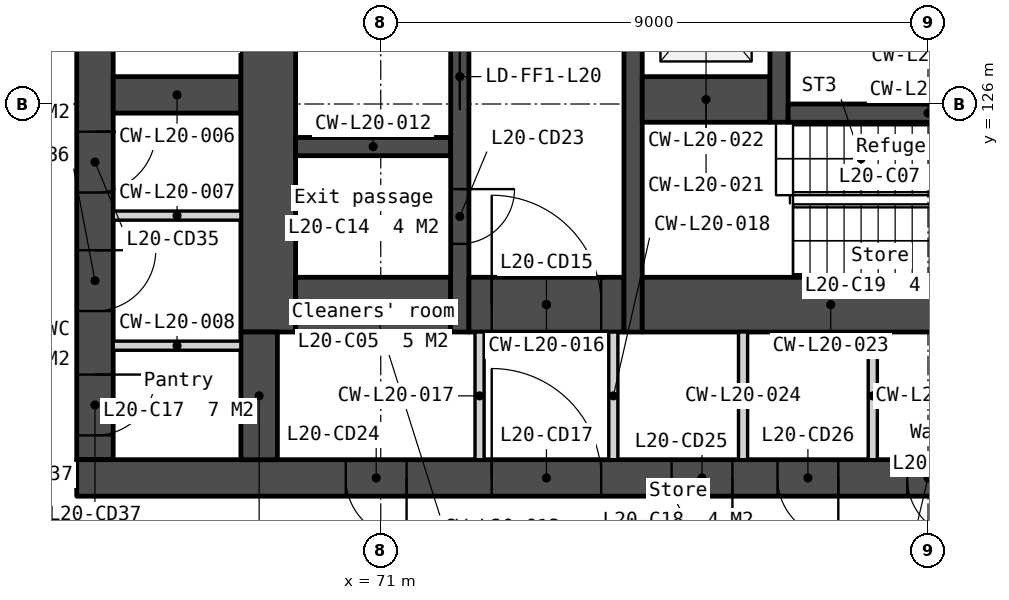
"""IFC4 building model, lengths in metres.
Left out: names, types, materials, properties, quantities, classifications, styles, units other than length and angle.
Written with IfcOpenShell. Run it as: python <this file> out.ifc"""

import sys

from ifc_helpers import new_model, si_unit, direction, frame, frame_2d, origin, place, context, subcontext, project, spatial, polyline, rectangle, outline, extrude, element, fill, save


model = new_model("IFC4")
c1 = context("Model", 3, precision=1e-05, world=origin(), true_north=direction((0.0, 1.0)))
c2 = subcontext(c1, "Body", "Model", "MODEL_VIEW")
j1 = project(units=[si_unit("LENGTHUNIT", "METRE"), si_unit("PLANEANGLEUNIT", "RADIAN")], contexts=[c1])
p1 = place(None, origin())
s1 = spatial("IfcSite", under=j1, at=p1, CompositionType="ELEMENT")
p2 = place(p1, origin())
s2 = spatial("IfcBuilding", under=s1, at=p2, CompositionType="ELEMENT")
p3 = place(p2, frame((0.0, 0.0, 85.3)))
s3 = spatial("IfcBuildingStorey", under=s2, at=p3, CompositionType="ELEMENT", Elevation=85.3)
p4 = place(p3, frame((66.3, 133.95, 0.0), z_axis=(0.0, 0.0, 1.0), x_axis=(0.0, -1.0, 0.0)))
e1 = element("IfcWall", 1, at=p4, inside=s3, PredefinedType="SOLIDWALL", context=c2, shape_type="SweptSolid", body=[
    extrude(rectangle(XDim=13.8, YDim=0.6, at=frame_2d((6.9, 0.0))), origin(), (0.0, 0.0, 1.0), 3.35),
])
p5 = place(p4, frame((0.6, 0.0, 0.0)))
e2 = element("IfcOpeningElement", 2, at=p5, cuts=e1, PredefinedType="OPENING", context=c2, shape_type="SweptSolid", body=[
    extrude(rectangle(XDim=1.1, YDim=2.1, at=frame_2d((0.55, 1.05))), frame((0.0, 0.31, 0.0), z_axis=(0.0, -1.0, 0.0), x_axis=(1.0, 0.0, 0.0)), (0.0, 0.0, 1.0), 0.62),
])
p6 = place(p4, frame((8.405, 0.0, 0.0)))
e3 = element("IfcOpeningElement", 3, at=p6, cuts=e1, PredefinedType="OPENING", context=c2, shape_type="SweptSolid", body=[
    extrude(rectangle(XDim=1.0, YDim=2.1, at=frame_2d((0.5, 1.05))), frame((0.0, 0.31, 0.0), z_axis=(0.0, -1.0, 0.0), x_axis=(1.0, 0.0, 0.0)), (0.0, 0.0, 1.0), 0.62),
])
p7 = place(p4, frame((10.355, 0.0, 0.0)))
e4 = element("IfcOpeningElement", 4, at=p7, cuts=e1, PredefinedType="OPENING", context=c2, shape_type="SweptSolid", body=[
    extrude(rectangle(XDim=1.0, YDim=2.1, at=frame_2d((0.5, 1.05))), frame((0.0, 0.31, 0.0), z_axis=(0.0, -1.0, 0.0), x_axis=(1.0, 0.0, 0.0)), (0.0, 0.0, 1.0), 0.62),
])
p8 = place(p4, frame((12.4, 0.0, 0.0)))
e5 = element("IfcOpeningElement", 5, at=p8, cuts=e1, PredefinedType="OPENING", context=c2, shape_type="SweptSolid", body=[
    extrude(rectangle(XDim=1.0, YDim=2.1, at=frame_2d((0.5, 1.05))), frame((0.0, 0.31, 0.0), z_axis=(0.0, -1.0, 0.0), x_axis=(1.0, 0.0, 0.0)), (0.0, 0.0, 1.0), 0.62),
])
p9 = place(p3, frame((66.0, 119.85, 0.0), z_axis=(0.0, 0.0, 1.0), x_axis=(1.0, 0.0, 0.0)))
e6 = element("IfcWall", 6, at=p9, inside=s3, PredefinedType="SOLIDWALL", context=c2, shape_type="SweptSolid", body=[
    extrude(rectangle(XDim=28.0, YDim=0.6, at=frame_2d((14.0, 0.0))), origin(), (0.0, 0.0, 1.0), 3.35),
])
p10 = place(p9, frame((6.825, 0.0, 0.0)))
e7 = element("IfcOpeningElement", 7, at=p10, cuts=e6, PredefinedType="OPENING", context=c2, shape_type="SweptSolid", body=[
    extrude(rectangle(XDim=1.8, YDim=2.1, at=frame_2d((0.9, 1.05))), frame((0.0, 0.31, 0.0), z_axis=(0.0, -1.0, 0.0), x_axis=(1.0, 0.0, 0.0)), (0.0, 0.0, 1.0), 0.62),
])
p11 = place(p9, frame((15.85, 0.0, 0.0)))
e8 = element("IfcOpeningElement", 8, at=p11, cuts=e6, PredefinedType="OPENING", context=c2, shape_type="SweptSolid", body=[
    extrude(rectangle(XDim=1.5, YDim=2.1, at=frame_2d((0.75, 1.05))), frame((0.0, 0.31, 0.0), z_axis=(0.0, -1.0, 0.0), x_axis=(1.0, 0.0, 0.0)), (0.0, 0.0, 1.0), 0.62),
])
p12 = place(p9, frame((19.375, 0.0, 0.0)))
e9 = element("IfcOpeningElement", 9, at=p12, cuts=e6, PredefinedType="OPENING", context=c2, shape_type="SweptSolid", body=[
    extrude(rectangle(XDim=1.8, YDim=2.1, at=frame_2d((0.9, 1.05))), frame((0.0, 0.31, 0.0), z_axis=(0.0, -1.0, 0.0), x_axis=(1.0, 0.0, 0.0)), (0.0, 0.0, 1.0), 0.62),
])
p13 = place(p9, frame((4.425, 0.0, 0.0)))
e10 = element("IfcOpeningElement", 10, at=p13, cuts=e6, PredefinedType="OPENING", context=c2, shape_type="SweptSolid", body=[
    extrude(rectangle(XDim=1.0, YDim=2.1, at=frame_2d((0.5, 1.05))), frame((0.0, 0.31, 0.0), z_axis=(0.0, -1.0, 0.0), x_axis=(1.0, 0.0, 0.0)), (0.0, 0.0, 1.0), 0.62),
])
p14 = place(p9, frame((9.783, 0.0, 0.0)))
e11 = element("IfcOpeningElement", 11, at=p14, cuts=e6, PredefinedType="OPENING", context=c2, shape_type="SweptSolid", body=[
    extrude(rectangle(XDim=1.0, YDim=2.1, at=frame_2d((0.5, 1.05))), frame((0.0, 0.31, 0.0), z_axis=(0.0, -1.0, 0.0), x_axis=(1.0, 0.0, 0.0)), (0.0, 0.0, 1.0), 0.62),
])
p15 = place(p9, frame((11.525, 0.0, 0.0)))
e12 = element("IfcOpeningElement", 12, at=p15, cuts=e6, PredefinedType="OPENING", context=c2, shape_type="SweptSolid", body=[
    extrude(rectangle(XDim=1.0, YDim=2.1, at=frame_2d((0.5, 1.05))), frame((0.0, 0.31, 0.0), z_axis=(0.0, -1.0, 0.0), x_axis=(1.0, 0.0, 0.0)), (0.0, 0.0, 1.0), 0.62),
])
p16 = place(p9, frame((13.658, 0.0, 0.0)))
e13 = element("IfcOpeningElement", 13, at=p16, cuts=e6, PredefinedType="OPENING", context=c2, shape_type="SweptSolid", body=[
    extrude(rectangle(XDim=1.0, YDim=2.1, at=frame_2d((0.5, 1.05))), frame((0.0, 0.31, 0.0), z_axis=(0.0, -1.0, 0.0), x_axis=(1.0, 0.0, 0.0)), (0.0, 0.0, 1.0), 0.62),
])
p17 = place(p9, frame((21.725, 0.0, 0.0)))
e14 = element("IfcOpeningElement", 14, at=p17, cuts=e6, PredefinedType="OPENING", context=c2, shape_type="SweptSolid", body=[
    extrude(rectangle(XDim=1.0, YDim=2.1, at=frame_2d((0.5, 1.05))), frame((0.0, 0.31, 0.0), z_axis=(0.0, -1.0, 0.0), x_axis=(1.0, 0.0, 0.0)), (0.0, 0.0, 1.0), 0.62),
])
p18 = place(p9, frame((23.425, 0.0, 0.0)))
e15 = element("IfcOpeningElement", 15, at=p18, cuts=e6, PredefinedType="OPENING", context=c2, shape_type="SweptSolid", body=[
    extrude(rectangle(XDim=1.0, YDim=2.1, at=frame_2d((0.5, 1.05))), frame((0.0, 0.31, 0.0), z_axis=(0.0, -1.0, 0.0), x_axis=(1.0, 0.0, 0.0)), (0.0, 0.0, 1.0), 0.62),
])
p19 = place(p3, frame((66.6, 126.15, 0.0), z_axis=(0.0, 0.0, 1.0), x_axis=(1.0, 0.0, 0.0)))
e16 = element("IfcWall", 16, at=p19, inside=s3, PredefinedType="SOLIDWALL", context=c2, shape_type="SweptSolid", body=[
    extrude(rectangle(XDim=2.1, YDim=0.6, at=frame_2d((1.05, 0.0))), origin(), (0.0, 0.0, 1.0), 3.35),
])
for number, where, z_axis, x_axis in (
    (17, (66.6, 124.165, 0.0), (0.0, 0.0, 1.0), (1.0, 0.0, 0.0)),
    (18, (66.6, 122.025, 0.0), (0.0, 0.0, 1.0), (1.0, 0.0, 0.0)),
):
    element("IfcWall", number, at=place(p3, frame(where, z_axis=z_axis, x_axis=x_axis)), inside=s3, PredefinedType="PARTITIONING", context=c2, shape_type="SweptSolid", body=[
        extrude(rectangle(XDim=2.1, YDim=0.15, at=frame_2d((1.05, 0.0))), origin(), (0.0, 0.0, 1.0), 3.35),
    ])
p20 = place(p3, frame((69.15, 133.95, 0.0), z_axis=(0.0, 0.0, 1.0), x_axis=(0.0, -1.0, 0.0)))
e19 = element("IfcWall", 19, at=p20, inside=s3, PredefinedType="SOLIDWALL", context=c2, shape_type="SweptSolid", body=[
    extrude(rectangle(XDim=11.7, YDim=0.9, at=frame_2d((5.85, 0.0))), origin(), (0.0, 0.0, 1.0), 3.35),
])
p21 = place(p3, frame((69.0, 122.25, 0.0), z_axis=(0.0, 0.0, 1.0), x_axis=(0.0, -1.0, 0.0)))
e20 = element("IfcWall", 20, at=p21, inside=s3, PredefinedType="SOLIDWALL", context=c2, shape_type="SweptSolid", body=[
    extrude(rectangle(XDim=2.1, YDim=0.6, at=frame_2d((1.05, 0.0))), origin(), (0.0, 0.0, 1.0), 3.35),
])
p22 = place(p3, frame((69.6, 125.3, 0.0), z_axis=(0.0, 0.0, 1.0), x_axis=(1.0, 0.0, 0.0)))
e21 = element("IfcWall", 21, at=p22, inside=s3, PredefinedType="SOLIDWALL", context=c2, shape_type="SweptSolid", body=[
    extrude(rectangle(XDim=2.55, YDim=0.3, at=frame_2d((1.275, 0.0))), origin(), (0.0, 0.0, 1.0), 3.35),
])
p23 = place(p3, frame((69.6, 122.7, 0.0), z_axis=(0.0, 0.0, 1.0), x_axis=(1.0, 0.0, 0.0)))
e22 = element("IfcWall", 22, at=p23, inside=s3, PredefinedType="SOLIDWALL", context=c2, shape_type="SweptSolid", body=[
    extrude(rectangle(XDim=2.55, YDim=0.9, at=frame_2d((1.275, 0.0))), origin(), (0.0, 0.0, 1.0), 3.35),
])
p24 = place(p3, frame((72.3, 133.95, 0.0), z_axis=(0.0, 0.0, 1.0), x_axis=(0.0, -1.0, 0.0)))
e23 = element("IfcWall", 23, at=p24, inside=s3, PredefinedType="SOLIDWALL", context=c2, shape_type="SweptSolid", body=[
    extrude(rectangle(XDim=11.7, YDim=0.3, at=frame_2d((5.85, 0.0))), origin(), (0.0, 0.0, 1.0), 3.35),
])
p25 = place(p24, frame((6.95, 0.0, 0.0)))
e24 = element("IfcOpeningElement", 24, at=p25, cuts=e23, PredefinedType="OPENING", context=c2, shape_type="SweptSolid", body=[
    extrude(rectangle(XDim=1.1, YDim=2.1, at=frame_2d((0.55, 1.05))), frame((0.0, 0.16, 0.0), z_axis=(0.0, -1.0, 0.0), x_axis=(1.0, 0.0, 0.0)), (0.0, 0.0, 1.0), 0.32),
])
p26 = place(p24, frame((9.35, 0.0, 0.0)))
e25 = element("IfcOpeningElement", 25, at=p26, cuts=e23, PredefinedType="OPENING", context=c2, shape_type="SweptSolid", body=[
    extrude(rectangle(XDim=0.9, YDim=2.1, at=frame_2d((0.45, 1.05))), frame((0.0, 0.16, 0.0), z_axis=(0.0, -1.0, 0.0), x_axis=(1.0, 0.0, 0.0)), (0.0, 0.0, 1.0), 0.32),
])
p27 = place(p24, frame((5.1, 0.0, 0.0)))
e26 = element("IfcOpeningElement", 26, at=p27, cuts=e23, PredefinedType="OPENING", context=c2, shape_type="SweptSolid", body=[
    extrude(rectangle(XDim=1.0, YDim=2.1, at=frame_2d((0.5, 1.05))), frame((0.0, 0.16, 0.0), z_axis=(0.0, -1.0, 0.0), x_axis=(1.0, 0.0, 0.0)), (0.0, 0.0, 1.0), 0.32),
])
p28 = place(p3, frame((72.45, 122.7, 0.0), z_axis=(0.0, 0.0, 1.0), x_axis=(1.0, 0.0, 0.0)))
e27 = element("IfcWall", 27, at=p28, inside=s3, PredefinedType="SOLIDWALL", context=c2, shape_type="SweptSolid", body=[
    extrude(rectangle(XDim=2.55, YDim=0.9, at=frame_2d((1.275, 0.0))), origin(), (0.0, 0.0, 1.0), 3.35),
])
p29 = place(p28, frame((0.375, 0.0, 0.0)))
e28 = element("IfcOpeningElement", 28, at=p29, cuts=e27, PredefinedType="OPENING", context=c2, shape_type="SweptSolid", body=[
    extrude(rectangle(XDim=1.8, YDim=2.1, at=frame_2d((0.9, 1.05))), frame((0.0, 0.46, 0.0), z_axis=(0.0, -1.0, 0.0), x_axis=(1.0, 0.0, 0.0)), (0.0, 0.0, 1.0), 0.92),
])
for number, where, z_axis, x_axis in (
    (29, (72.625, 122.25, 0.0), (0.0, 0.0, 1.0), (0.0, -1.0, 0.0)),
    (30, (74.825, 122.25, 0.0), (0.0, 0.0, 1.0), (0.0, -1.0, 0.0)),
):
    element("IfcWall", number, at=place(p3, frame(where, z_axis=z_axis, x_axis=x_axis)), inside=s3, PredefinedType="PARTITIONING", context=c2, shape_type="SweptSolid", body=[
        extrude(rectangle(XDim=2.1, YDim=0.15, at=frame_2d((1.05, 0.0))), origin(), (0.0, 0.0, 1.0), 3.35),
    ])
p30 = place(p3, frame((75.15, 133.95, 0.0), z_axis=(0.0, 0.0, 1.0), x_axis=(0.0, -1.0, 0.0)))
e31 = element("IfcWall", 31, at=p30, inside=s3, PredefinedType="SOLIDWALL", context=c2, shape_type="SweptSolid", body=[
    extrude(rectangle(XDim=11.7, YDim=0.3, at=frame_2d((5.85, 0.0))), origin(), (0.0, 0.0, 1.0), 3.35),
])
p31 = place(p3, frame((75.3, 126.075, 0.0), z_axis=(0.0, 0.0, 1.0), x_axis=(1.0, 0.0, 0.0)))
e32 = element("IfcWall", 32, at=p31, inside=s3, PredefinedType="SOLIDWALL", context=c2, shape_type="SweptSolid", body=[
    extrude(rectangle(XDim=2.1, YDim=0.75, at=frame_2d((1.05, 0.0))), origin(), (0.0, 0.0, 1.0), 3.35),
])
p32 = place(p3, frame((75.3, 122.7, 0.0), z_axis=(0.0, 0.0, 1.0), x_axis=(1.0, 0.0, 0.0)))
e33 = element("IfcWall", 33, at=p32, inside=s3, PredefinedType="SOLIDWALL", context=c2, shape_type="SweptSolid", body=[
    extrude(rectangle(XDim=6.2, YDim=0.9, at=frame_2d((3.1, 0.0))), origin(), (0.0, 0.0, 1.0), 3.35),
])
p33 = place(p3, frame((76.958, 122.25, 0.0), z_axis=(0.0, 0.0, 1.0), x_axis=(0.0, -1.0, 0.0)))
e34 = element("IfcWall", 34, at=p33, inside=s3, PredefinedType="PARTITIONING", context=c2, shape_type="SweptSolid", body=[
    extrude(rectangle(XDim=2.1, YDim=0.15, at=frame_2d((1.05, 0.0))), origin(), (0.0, 0.0, 1.0), 3.35),
])
p34 = place(p3, frame((77.55, 133.95, 0.0), z_axis=(0.0, 0.0, 1.0), x_axis=(0.0, -1.0, 0.0)))
e35 = element("IfcWall", 35, at=p34, inside=s3, PredefinedType="SOLIDWALL", context=c2, shape_type="SweptSolid", body=[
    extrude(rectangle(XDim=8.25, YDim=0.3, at=frame_2d((4.125, 0.0))), origin(), (0.0, 0.0, 1.0), 3.35),
])
p35 = place(p34, frame((0.6, 0.0, 0.0)))
e36 = element("IfcOpeningElement", 36, at=p35, cuts=e35, PredefinedType="OPENING", context=c2, shape_type="SweptSolid", body=[
    extrude(rectangle(XDim=1.1, YDim=2.1, at=frame_2d((0.55, 1.05))), frame((0.0, 0.16, 0.0), z_axis=(0.0, -1.0, 0.0), x_axis=(1.0, 0.0, 0.0)), (0.0, 0.0, 1.0), 0.32),
])
p36 = place(p34, frame((3.2, 0.0, 0.0)))
e37 = element("IfcOpeningElement", 37, at=p36, cuts=e35, PredefinedType="OPENING", context=c2, shape_type="SweptSolid", body=[
    extrude(rectangle(XDim=1.1, YDim=2.1, at=frame_2d((0.55, 1.05))), frame((0.0, 0.16, 0.0), z_axis=(0.0, -1.0, 0.0), x_axis=(1.0, 0.0, 0.0)), (0.0, 0.0, 1.0), 0.32),
])
p37 = place(p34, frame((5.8, 0.0, 0.0)))
e38 = element("IfcOpeningElement", 38, at=p37, cuts=e35, PredefinedType="OPENING", context=c2, shape_type="SweptSolid", body=[
    extrude(rectangle(XDim=1.1, YDim=2.1, at=frame_2d((0.55, 1.05))), frame((0.0, 0.16, 0.0), z_axis=(0.0, -1.0, 0.0), x_axis=(1.0, 0.0, 0.0)), (0.0, 0.0, 1.0), 0.32),
])
p38 = place(p3, frame((77.7, 125.85, 0.0), z_axis=(0.0, 0.0, 1.0), x_axis=(1.0, 0.0, 0.0)))
e39 = element("IfcWall", 39, at=p38, inside=s3, PredefinedType="SOLIDWALL", context=c2, shape_type="SweptSolid", body=[
    extrude(rectangle(XDim=4.6, YDim=0.3, at=frame_2d((2.3, 0.0))), origin(), (0.0, 0.0, 1.0), 3.35),
])
p39 = place(p3, frame((79.092, 122.25, 0.0), z_axis=(0.0, 0.0, 1.0), x_axis=(0.0, -1.0, 0.0)))
e40 = element("IfcWall", 40, at=p39, inside=s3, PredefinedType="PARTITIONING", context=c2, shape_type="SweptSolid", body=[
    extrude(rectangle(XDim=2.1, YDim=0.15, at=frame_2d((1.05, 0.0))), origin(), (0.0, 0.0, 1.0), 3.35),
])
p40 = place(p3, frame((56.073, 130.263, -0.15), z_axis=(0.0, 0.0, 1.0), x_axis=(0.500000478905, -0.866025127289, 0.0)))
e41 = element("IfcWall", 41, at=p40, inside=s3, PredefinedType="SOLIDWALL", context=c2, shape_type="SweptSolid", body=[
    extrude(outline(polyline([(42.643, 0.0), (42.643, 3.5), (0.0, 3.5), (0.0, 0.0), (42.643, 0.0)])), frame((0.0, 0.225, 0.0), z_axis=(0.0, -1.0, 0.0), x_axis=(1.0, 0.0, 0.0)), (0.0, 0.0, 1.0), 0.45),
])
p41 = place(p40, frame((7.079, 0.0, 1.05)))
e42 = element("IfcOpeningElement", 42, at=p41, cuts=e41, PredefinedType="OPENING", context=c2, shape_type="SweptSolid", body=[
    extrude(rectangle(XDim=1.2, YDim=1.5, at=frame_2d((0.6, 0.75))), frame((0.0, 0.235, 0.0), z_axis=(0.0, -1.0, 0.0), x_axis=(1.0, 0.0, 0.0)), (0.0, 0.0, 1.0), 0.47),
])
p42 = place(p40, frame((8.779, 0.0, 1.05)))
e43 = element("IfcOpeningElement", 43, at=p42, cuts=e41, PredefinedType="OPENING", context=c2, shape_type="SweptSolid", body=[
    extrude(rectangle(XDim=1.2, YDim=1.5, at=frame_2d((0.6, 0.75))), frame((0.0, 0.235, 0.0), z_axis=(0.0, -1.0, 0.0), x_axis=(1.0, 0.0, 0.0)), (0.0, 0.0, 1.0), 0.47),
])
p43 = place(p40, frame((15.607, 0.0, 1.05)))
e44 = element("IfcOpeningElement", 44, at=p43, cuts=e41, PredefinedType="OPENING", context=c2, shape_type="SweptSolid", body=[
    extrude(rectangle(XDim=1.2, YDim=1.5, at=frame_2d((0.6, 0.75))), frame((0.0, 0.235, 0.0), z_axis=(0.0, -1.0, 0.0), x_axis=(1.0, 0.0, 0.0)), (0.0, 0.0, 1.0), 0.47),
])
p44 = place(p40, frame((17.307, 0.0, 1.05)))
e45 = element("IfcOpeningElement", 45, at=p44, cuts=e41, PredefinedType="OPENING", context=c2, shape_type="SweptSolid", body=[
    extrude(rectangle(XDim=1.2, YDim=1.5, at=frame_2d((0.6, 0.75))), frame((0.0, 0.235, 0.0), z_axis=(0.0, -1.0, 0.0), x_axis=(1.0, 0.0, 0.0)), (0.0, 0.0, 1.0), 0.47),
])
p45 = place(p40, frame((24.136, 0.0, 1.05)))
e46 = element("IfcOpeningElement", 46, at=p45, cuts=e41, PredefinedType="OPENING", context=c2, shape_type="SweptSolid", body=[
    extrude(rectangle(XDim=1.2, YDim=1.5, at=frame_2d((0.6, 0.75))), frame((0.0, 0.235, 0.0), z_axis=(0.0, -1.0, 0.0), x_axis=(1.0, 0.0, 0.0)), (0.0, 0.0, 1.0), 0.47),
])
p46 = place(p40, frame((25.836, 0.0, 1.05)))
e47 = element("IfcOpeningElement", 47, at=p46, cuts=e41, PredefinedType="OPENING", context=c2, shape_type="SweptSolid", body=[
    extrude(rectangle(XDim=1.2, YDim=1.5, at=frame_2d((0.6, 0.75))), frame((0.0, 0.235, 0.0), z_axis=(0.0, -1.0, 0.0), x_axis=(1.0, 0.0, 0.0)), (0.0, 0.0, 1.0), 0.47),
])
p47 = place(p40, frame((32.665, 0.0, 1.05)))
e48 = element("IfcOpeningElement", 48, at=p47, cuts=e41, PredefinedType="OPENING", context=c2, shape_type="SweptSolid", body=[
    extrude(rectangle(XDim=1.2, YDim=1.5, at=frame_2d((0.6, 0.75))), frame((0.0, 0.235, 0.0), z_axis=(0.0, -1.0, 0.0), x_axis=(1.0, 0.0, 0.0)), (0.0, 0.0, 1.0), 0.47),
])
p48 = place(p40, frame((34.365, 0.0, 1.05)))
e49 = element("IfcOpeningElement", 49, at=p48, cuts=e41, PredefinedType="OPENING", context=c2, shape_type="SweptSolid", body=[
    extrude(rectangle(XDim=1.2, YDim=1.5, at=frame_2d((0.6, 0.75))), frame((0.0, 0.235, 0.0), z_axis=(0.0, -1.0, 0.0), x_axis=(1.0, 0.0, 0.0)), (0.0, 0.0, 1.0), 0.47),
])
p49 = place(p25, origin())
e50 = element("IfcDoor", 50, at=p49, inside=s3, OperationType="SLIDING_TO_LEFT", PredefinedType="DOOR", context=c2, shape_type="SweptSolid", body=[
    extrude(rectangle(XDim=1.1, YDim=2.1, at=frame_2d((0.55, 1.05))), frame((0.0, 0.025, 0.0), z_axis=(0.0, -1.0, 0.0), x_axis=(1.0, 0.0, 0.0)), (0.0, 0.0, 1.0), 0.05),
])
fill(e24, e50)
p50 = place(p29, origin())
e51 = element("IfcDoor", 51, at=p50, inside=s3, OperationType="DOUBLE_DOOR_DOUBLE_SWING", PredefinedType="DOOR", context=c2, shape_type="SweptSolid", body=[
    extrude(rectangle(XDim=1.8, YDim=2.1, at=frame_2d((0.9, 1.05))), frame((0.0, 0.025, 0.0), z_axis=(0.0, -1.0, 0.0), x_axis=(1.0, 0.0, 0.0)), (0.0, 0.0, 1.0), 0.05),
])
fill(e28, e51)
p51 = place(p10, origin())
e52 = element("IfcDoor", 52, at=p51, inside=s3, OperationType="DOUBLE_DOOR_DOUBLE_SWING", PredefinedType="DOOR", context=c2, shape_type="SweptSolid", body=[
    extrude(rectangle(XDim=1.8, YDim=2.1, at=frame_2d((0.9, 1.05))), frame((0.0, 0.025, 0.0), z_axis=(0.0, -1.0, 0.0), x_axis=(1.0, 0.0, 0.0)), (0.0, 0.0, 1.0), 0.05),
])
fill(e7, e52)
p52 = place(p26, origin())
e53 = element("IfcDoor", 53, at=p52, inside=s3, OperationType="SINGLE_SWING_LEFT", PredefinedType="DOOR", context=c2, shape_type="SweptSolid", body=[
    extrude(rectangle(XDim=0.9, YDim=2.1, at=frame_2d((0.45, 1.05))), frame((0.0, 0.025, 0.0), z_axis=(0.0, -1.0, 0.0), x_axis=(1.0, 0.0, 0.0)), (0.0, 0.0, 1.0), 0.05),
])
fill(e25, e53)
p53 = place(p13, origin())
e54 = element("IfcDoor", 54, at=p53, inside=s3, OperationType="SINGLE_SWING_RIGHT", PredefinedType="DOOR", context=c2, shape_type="SweptSolid", body=[
    extrude(rectangle(XDim=1.0, YDim=2.1, at=frame_2d((0.5, 1.05))), frame((0.0, 0.025, 0.0), z_axis=(0.0, -1.0, 0.0), x_axis=(1.0, 0.0, 0.0)), (0.0, 0.0, 1.0), 0.05),
])
fill(e10, e54)
p54 = place(p14, origin())
e55 = element("IfcDoor", 55, at=p54, inside=s3, OperationType="SINGLE_SWING_RIGHT", PredefinedType="DOOR", context=c2, shape_type="SweptSolid", body=[
    extrude(rectangle(XDim=1.0, YDim=2.1, at=frame_2d((0.5, 1.05))), frame((0.0, 0.025, 0.0), z_axis=(0.0, -1.0, 0.0), x_axis=(1.0, 0.0, 0.0)), (0.0, 0.0, 1.0), 0.05),
])
fill(e11, e55)
p55 = place(p15, origin())
e56 = element("IfcDoor", 56, at=p55, inside=s3, OperationType="SINGLE_SWING_RIGHT", PredefinedType="DOOR", context=c2, shape_type="SweptSolid", body=[
    extrude(rectangle(XDim=1.0, YDim=2.1, at=frame_2d((0.5, 1.05))), frame((0.0, 0.025, 0.0), z_axis=(0.0, -1.0, 0.0), x_axis=(1.0, 0.0, 0.0)), (0.0, 0.0, 1.0), 0.05),
])
fill(e12, e56)
p56 = place(p16, origin())
e57 = element("IfcDoor", 57, at=p56, inside=s3, OperationType="SINGLE_SWING_RIGHT", PredefinedType="DOOR", context=c2, shape_type="SweptSolid", body=[
    extrude(rectangle(XDim=1.0, YDim=2.1, at=frame_2d((0.5, 1.05))), frame((0.0, 0.025, 0.0), z_axis=(0.0, -1.0, 0.0), x_axis=(1.0, 0.0, 0.0)), (0.0, 0.0, 1.0), 0.05),
])
fill(e13, e57)
p57 = place(p6, origin())
e58 = element("IfcDoor", 58, at=p57, inside=s3, OperationType="SINGLE_SWING_LEFT", PredefinedType="DOOR", context=c2, shape_type="SweptSolid", body=[
    extrude(rectangle(XDim=1.0, YDim=2.1, at=frame_2d((0.5, 1.05))), frame((0.0, 0.025, 0.0), z_axis=(0.0, -1.0, 0.0), x_axis=(1.0, 0.0, 0.0)), (0.0, 0.0, 1.0), 0.05),
])
fill(e3, e58)
p58 = place(p7, origin())
e59 = element("IfcDoor", 59, at=p58, inside=s3, OperationType="SINGLE_SWING_LEFT", PredefinedType="DOOR", context=c2, shape_type="SweptSolid", body=[
    extrude(rectangle(XDim=1.0, YDim=2.1, at=frame_2d((0.5, 1.05))), frame((0.0, 0.025, 0.0), z_axis=(0.0, -1.0, 0.0), x_axis=(1.0, 0.0, 0.0)), (0.0, 0.0, 1.0), 0.05),
])
fill(e4, e59)
p59 = place(p8, origin())
e60 = element("IfcDoor", 60, at=p59, inside=s3, OperationType="SINGLE_SWING_LEFT", PredefinedType="DOOR", context=c2, shape_type="SweptSolid", body=[
    extrude(rectangle(XDim=1.0, YDim=2.1, at=frame_2d((0.5, 1.05))), frame((0.0, 0.025, 0.0), z_axis=(0.0, -1.0, 0.0), x_axis=(1.0, 0.0, 0.0)), (0.0, 0.0, 1.0), 0.05),
])
fill(e5, e60)
save(model, sys.argv[1])
